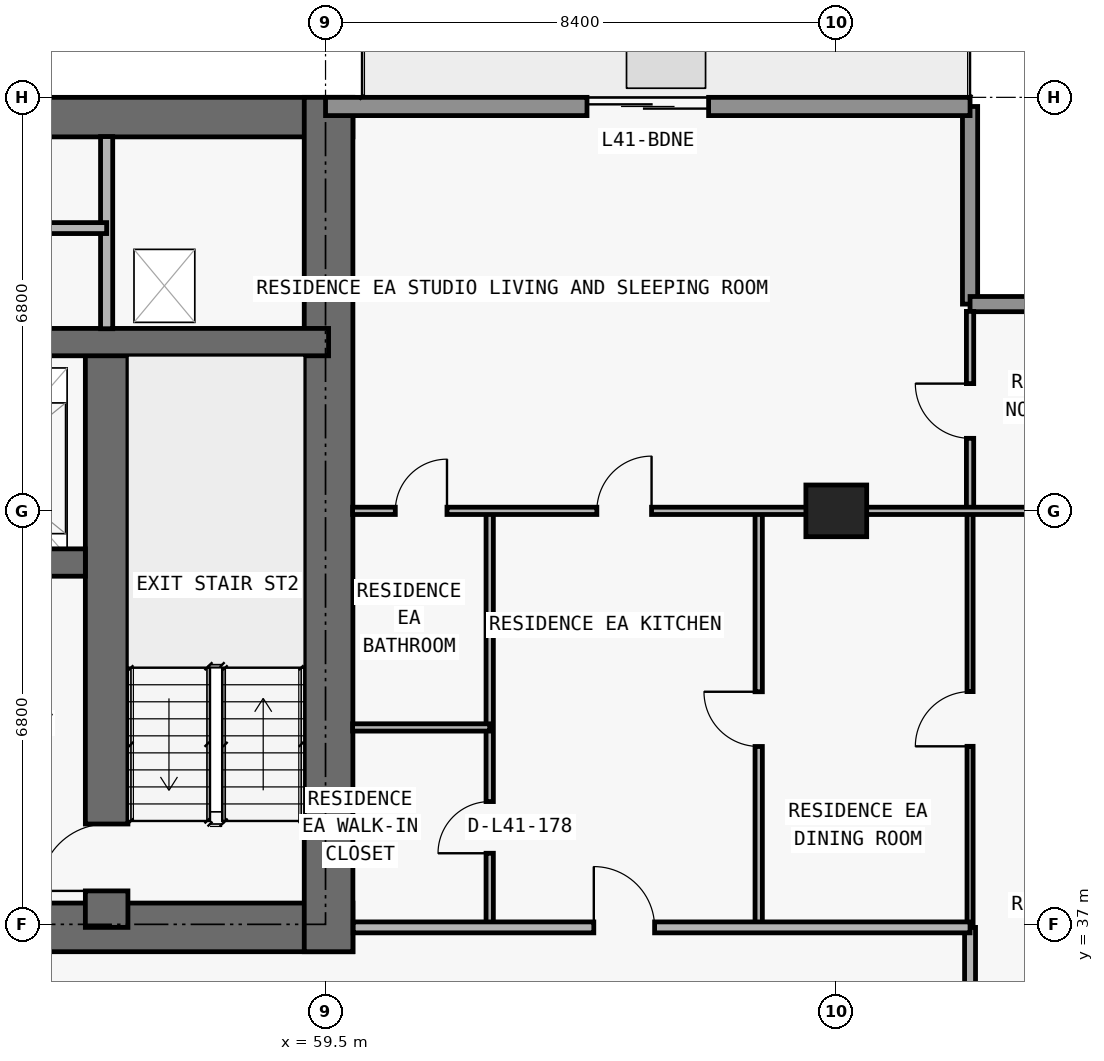
"""IFC4 building model, lengths in metres.
Left out: names, types, materials, properties, quantities, classifications, styles, units other than length and angle.
Written with IfcOpenShell. Run it as: python <this file> out.ifc"""

import sys

from ifc_helpers import new_model, si_unit, direction, frame, frame_2d, origin, origin_2d, place, context, subcontext, project, spatial, rectangle, extrude, element, fill, save


model = new_model("IFC4")
c1 = context("Model", 3, precision=1e-05, world=origin(), true_north=direction((0.0, 1.0)))
c2 = subcontext(c1, "Body", "Model", "MODEL_VIEW")
j1 = project(units=[si_unit("LENGTHUNIT", "METRE"), si_unit("PLANEANGLEUNIT", "RADIAN")], contexts=[c1])
p1 = place(None, origin())
s1 = spatial("IfcSite", under=j1, at=p1, CompositionType="ELEMENT")
p2 = place(p1, origin())
s2 = spatial("IfcBuilding", under=s1, at=p2, CompositionType="ELEMENT")
p3 = place(p2, frame((0.0, 0.0, 148.8)))
s3 = spatial("IfcBuildingStorey", under=s2, at=p3, CompositionType="ELEMENT", Elevation=148.8)
p4 = place(p3, frame((67.9, 43.8, 0.0), z_axis=(0.0, 0.0, 1.0), x_axis=(1.0, 0.0, 0.0)))
e1 = element("IfcColumn", 1, at=p4, inside=s3, PredefinedType="COLUMN", context=c2, shape_type="SweptSolid", body=[
    extrude(rectangle(XDim=1.0, YDim=0.85, at=origin_2d()), origin(), (0.0, 0.0, 1.0), 3.0),
])
p5 = place(p3, frame((17.85, 36.95, 0.0), z_axis=(0.0, 0.0, 1.0), x_axis=(1.0, 0.0, 0.0)))
e2 = element("IfcWall", 2, at=p5, inside=s3, PredefinedType="SHEAR", context=c2, shape_type="SweptSolid", body=[
    extrude(rectangle(XDim=42.1, YDim=0.8, at=frame_2d((21.05, 0.0))), origin(), (0.0, 0.0, 1.0), 3.0),
])
p6 = place(p5, frame((14.45, 0.0, 0.0)))
e3 = element("IfcOpeningElement", 3, at=p6, cuts=e2, PredefinedType="OPENING", context=c2, shape_type="SweptSolid", body=[
    extrude(rectangle(XDim=1.1, YDim=2.15, at=frame_2d((0.55, 1.075))), frame((0.0, 0.41, 0.0), z_axis=(0.0, -1.0, 0.0), x_axis=(1.0, 0.0, 0.0)), (0.0, 0.0, 1.0), 0.82),
])
p7 = place(p5, frame((6.3, 0.0, 0.0)))
e4 = element("IfcOpeningElement", 4, at=p7, cuts=e2, PredefinedType="OPENING", context=c2, shape_type="SweptSolid", body=[
    extrude(rectangle(XDim=1.05, YDim=2.15, at=frame_2d((0.525, 1.075))), frame((0.0, 0.41, 0.0), z_axis=(0.0, -1.0, 0.0), x_axis=(1.0, 0.0, 0.0)), (0.0, 0.0, 1.0), 0.82),
])
p8 = place(p5, frame((34.8, 0.0, 0.0)))
e5 = element("IfcOpeningElement", 5, at=p8, cuts=e2, PredefinedType="OPENING", context=c2, shape_type="SweptSolid", body=[
    extrude(rectangle(XDim=1.05, YDim=2.15, at=frame_2d((0.525, 1.075))), frame((0.0, 0.41, 0.0), z_axis=(0.0, -1.0, 0.0), x_axis=(1.0, 0.0, 0.0)), (0.0, 0.0, 1.0), 0.82),
])
p9 = place(p5, frame((10.913, 0.0, 0.0)))
e6 = element("IfcOpeningElement", 6, at=p9, cuts=e2, PredefinedType="OPENING", context=c2, shape_type="SweptSolid", body=[
    extrude(rectangle(XDim=1.05, YDim=2.15, at=frame_2d((0.525, 1.075))), frame((0.0, 0.41, 0.0), z_axis=(0.0, -1.0, 0.0), x_axis=(1.0, 0.0, 0.0)), (0.0, 0.0, 1.0), 0.82),
])
p10 = place(p5, frame((24.15, 0.0, 0.0)))
e7 = element("IfcOpeningElement", 7, at=p10, cuts=e2, PredefinedType="OPENING", context=c2, shape_type="SweptSolid", body=[
    extrude(rectangle(XDim=1.05, YDim=2.15, at=frame_2d((0.525, 1.075))), frame((0.0, 0.41, 0.0), z_axis=(0.0, -1.0, 0.0), x_axis=(1.0, 0.0, 0.0)), (0.0, 0.0, 1.0), 0.82),
])
p11 = place(p3, frame((17.85, 50.275, 0.0), z_axis=(0.0, 0.0, 1.0), x_axis=(1.0, 0.0, 0.0)))
e8 = element("IfcWall", 8, at=p11, inside=s3, PredefinedType="SHEAR", context=c2, shape_type="SweptSolid", body=[
    extrude(rectangle(XDim=42.1, YDim=0.65, at=frame_2d((21.05, 0.0))), origin(), (0.0, 0.0, 1.0), 3.0),
])
p12 = place(p3, frame((59.55, 36.55, 0.0), z_axis=(0.0, 0.0, 1.0), x_axis=(0.0, 1.0, 0.0)))
e9 = element("IfcWall", 9, at=p12, inside=s3, PredefinedType="SHEAR", context=c2, shape_type="SweptSolid", body=[
    extrude(rectangle(XDim=14.05, YDim=0.8, at=frame_2d((7.025, 0.0))), origin(), (0.0, 0.0, 1.0), 3.0),
])
p13 = place(p3, frame((55.9, 36.95, 0.0), z_axis=(0.0, 0.0, 1.0), x_axis=(0.0, 1.0, 0.0)))
e10 = element("IfcWall", 10, at=p13, inside=s3, PredefinedType="SHEAR", context=c2, shape_type="SweptSolid", body=[
    extrude(rectangle(XDim=9.625, YDim=0.7, at=frame_2d((4.812, 0.0))), origin(), (0.0, 0.0, 1.0), 3.0),
])
p14 = place(p13, frame((0.6, 0.0, 0.0)))
e11 = element("IfcOpeningElement", 11, at=p14, cuts=e10, PredefinedType="OPENING", context=c2, shape_type="SweptSolid", body=[
    extrude(rectangle(XDim=1.1, YDim=2.15, at=frame_2d((0.55, 1.075))), frame((0.0, 0.36, 0.0), z_axis=(0.0, -1.0, 0.0), x_axis=(1.0, 0.0, 0.0)), (0.0, 0.0, 1.0), 0.72),
])
p15 = place(p3, frame((22.25, 42.95, 0.0), z_axis=(0.0, 0.0, 1.0), x_axis=(1.0, 0.0, 0.0)))
e12 = element("IfcWall", 12, at=p15, inside=s3, PredefinedType="SHEAR", context=c2, shape_type="SweptSolid", body=[
    extrude(rectangle(XDim=33.3, YDim=0.45, at=frame_2d((16.65, 0.0))), origin(), (0.0, 0.0, 1.0), 3.0),
])
p16 = place(p15, frame((1.05, 0.0, 0.0)))
e13 = element("IfcOpeningElement", 13, at=p16, cuts=e12, PredefinedType="OPENING", context=c2, shape_type="SweptSolid", body=[
    extrude(rectangle(XDim=1.2, YDim=2.2, at=frame_2d((0.6, 1.1))), frame((0.0, 0.235, 0.0), z_axis=(0.0, -1.0, 0.0), x_axis=(1.0, 0.0, 0.0)), (0.0, 0.0, 1.0), 0.47),
])
p17 = place(p15, frame((31.05, 0.0, 0.0)))
e14 = element("IfcOpeningElement", 14, at=p17, cuts=e12, PredefinedType="OPENING", context=c2, shape_type="SweptSolid", body=[
    extrude(rectangle(XDim=1.2, YDim=2.2, at=frame_2d((0.6, 1.1))), frame((0.0, 0.235, 0.0), z_axis=(0.0, -1.0, 0.0), x_axis=(1.0, 0.0, 0.0)), (0.0, 0.0, 1.0), 0.47),
])
p18 = place(p15, frame((21.4, 0.0, 0.0)))
e15 = element("IfcOpeningElement", 15, at=p18, cuts=e12, PredefinedType="OPENING", context=c2, shape_type="SweptSolid", body=[
    extrude(rectangle(XDim=1.1, YDim=2.2, at=frame_2d((0.55, 1.1))), frame((0.0, 0.235, 0.0), z_axis=(0.0, -1.0, 0.0), x_axis=(1.0, 0.0, 0.0)), (0.0, 0.0, 1.0), 0.47),
])
p19 = place(p15, frame((24.0, 0.0, 0.0)))
e16 = element("IfcOpeningElement", 16, at=p19, cuts=e12, PredefinedType="OPENING", context=c2, shape_type="SweptSolid", body=[
    extrude(rectangle(XDim=1.1, YDim=2.2, at=frame_2d((0.55, 1.1))), frame((0.0, 0.235, 0.0), z_axis=(0.0, -1.0, 0.0), x_axis=(1.0, 0.0, 0.0)), (0.0, 0.0, 1.0), 0.47),
])
p20 = place(p15, frame((3.625, 0.0, 0.0)))
e17 = element("IfcOpeningElement", 17, at=p20, cuts=e12, PredefinedType="OPENING", context=c2, shape_type="SweptSolid", body=[
    extrude(rectangle(XDim=1.05, YDim=2.15, at=frame_2d((0.525, 1.075))), frame((0.0, 0.235, 0.0), z_axis=(0.0, -1.0, 0.0), x_axis=(1.0, 0.0, 0.0)), (0.0, 0.0, 1.0), 0.47),
])
p21 = place(p15, frame((28.675, 0.0, 0.0)))
e18 = element("IfcOpeningElement", 18, at=p21, cuts=e12, PredefinedType="OPENING", context=c2, shape_type="SweptSolid", body=[
    extrude(rectangle(XDim=1.05, YDim=2.15, at=frame_2d((0.525, 1.075))), frame((0.0, 0.235, 0.0), z_axis=(0.0, -1.0, 0.0), x_axis=(1.0, 0.0, 0.0)), (0.0, 0.0, 1.0), 0.47),
])
p22 = place(p15, frame((13.925, 0.0, 0.0)))
e19 = element("IfcOpeningElement", 19, at=p22, cuts=e12, PredefinedType="OPENING", context=c2, shape_type="SweptSolid", body=[
    extrude(rectangle(XDim=1.0, YDim=2.2, at=frame_2d((0.5, 1.1))), frame((0.0, 0.235, 0.0), z_axis=(0.0, -1.0, 0.0), x_axis=(1.0, 0.0, 0.0)), (0.0, 0.0, 1.0), 0.47),
])
p23 = place(p15, frame((18.05, 0.0, 0.0)))
e20 = element("IfcOpeningElement", 20, at=p23, cuts=e12, PredefinedType="OPENING", context=c2, shape_type="SweptSolid", body=[
    extrude(rectangle(XDim=1.0, YDim=2.2, at=frame_2d((0.5, 1.1))), frame((0.0, 0.235, 0.0), z_axis=(0.0, -1.0, 0.0), x_axis=(1.0, 0.0, 0.0)), (0.0, 0.0, 1.0), 0.47),
])
p24 = place(p3, frame((18.25, 46.575, 0.0), z_axis=(0.0, 0.0, 1.0), x_axis=(1.0, 0.0, 0.0)))
e21 = element("IfcWall", 21, at=p24, inside=s3, PredefinedType="SHEAR", context=c2, shape_type="SweptSolid", body=[
    extrude(rectangle(XDim=41.3, YDim=0.45, at=frame_2d((20.65, 0.0))), origin(), (0.0, 0.0, 1.0), 3.0),
])
p25 = place(p24, frame((7.625, 0.0, 0.0)))
e22 = element("IfcOpeningElement", 22, at=p25, cuts=e21, PredefinedType="OPENING", context=c2, shape_type="SweptSolid", body=[
    extrude(rectangle(XDim=1.05, YDim=2.15, at=frame_2d((0.525, 1.075))), frame((0.0, 0.235, 0.0), z_axis=(0.0, -1.0, 0.0), x_axis=(1.0, 0.0, 0.0)), (0.0, 0.0, 1.0), 0.47),
])
p26 = place(p24, frame((32.675, 0.0, 0.0)))
e23 = element("IfcOpeningElement", 23, at=p26, cuts=e21, PredefinedType="OPENING", context=c2, shape_type="SweptSolid", body=[
    extrude(rectangle(XDim=1.05, YDim=2.15, at=frame_2d((0.525, 1.075))), frame((0.0, 0.235, 0.0), z_axis=(0.0, -1.0, 0.0), x_axis=(1.0, 0.0, 0.0)), (0.0, 0.0, 1.0), 0.47),
])
p27 = place(p3, frame((70.1, 50.45, 0.0), z_axis=(0.0, 0.0, 1.0), x_axis=(0.0, -1.0, 0.0)))
e24 = element("IfcWall", 24, at=p27, inside=s3, PredefinedType="ELEMENTEDWALL", context=c2, shape_type="SweptSolid", body=[
    extrude(rectangle(XDim=3.25, YDim=0.25, at=frame_2d((1.625, 0.0))), origin(), (0.0, 0.0, 1.0), 3.0),
])
p28 = place(p3, frame((70.1, 47.2, 0.0), z_axis=(0.0, 0.0, 1.0), x_axis=(1.0, 0.0, 0.0)))
e25 = element("IfcWall", 25, at=p28, inside=s3, PredefinedType="ELEMENTEDWALL", context=c2, shape_type="SweptSolid", body=[
    extrude(rectangle(XDim=3.65, YDim=0.25, at=frame_2d((1.825, 0.0))), origin(), (0.0, 0.0, 1.0), 3.0),
])
p29 = place(p3, frame((59.5, 50.45, 0.0), z_axis=(0.0, 0.0, 1.0), x_axis=(1.0, 0.0, 0.0)))
e26 = element("IfcWall", 26, at=p29, inside=s3, PredefinedType="STANDARD", context=c2, shape_type="SweptSolid", body=[
    extrude(rectangle(XDim=10.6, YDim=0.3, at=frame_2d((5.3, 0.0))), origin(), (0.0, 0.0, 1.0), 3.0),
])
p30 = place(p29, frame((4.3, 0.0, 0.0)))
e27 = element("IfcOpeningElement", 27, at=p30, cuts=e26, PredefinedType="OPENING", context=c2, shape_type="SweptSolid", body=[
    extrude(rectangle(XDim=2.0, YDim=2.3, at=frame_2d((1.0, 1.15))), frame((0.0, 0.16, 0.0), z_axis=(0.0, -1.0, 0.0), x_axis=(1.0, 0.0, 0.0)), (0.0, 0.0, 1.0), 0.32),
])
p31 = place(p3, frame((55.9, 46.795, 0.0), z_axis=(0.0, 0.0, 1.0), x_axis=(0.0, 1.0, 0.0)))
e28 = element("IfcWall", 28, at=p31, inside=s3, PredefinedType="PARTITIONING", context=c2, shape_type="SweptSolid", body=[
    extrude(rectangle(XDim=3.16, YDim=0.2, at=frame_2d((1.58, 0.0))), origin(), (0.0, 0.0, 1.0), 3.0),
])
p32 = place(p3, frame((62.2, 36.95, 0.0), z_axis=(0.0, 0.0, 1.0), x_axis=(0.0, 1.0, 0.0)))
e29 = element("IfcWall", 29, at=p32, inside=s3, PredefinedType="PARTITIONING", context=c2, shape_type="SweptSolid", body=[
    extrude(rectangle(XDim=6.85, YDim=0.12, at=frame_2d((3.425, 0.0))), origin(), (0.0, 0.0, 1.0), 3.0),
])
p33 = place(p32, frame((1.219, 0.0, 0.0)))
e30 = element("IfcOpeningElement", 30, at=p33, cuts=e29, PredefinedType="OPENING", context=c2, shape_type="SweptSolid", body=[
    extrude(rectangle(XDim=0.85, YDim=2.1, at=frame_2d((0.425, 1.05))), frame((0.0, 0.07, 0.0), z_axis=(0.0, -1.0, 0.0), x_axis=(1.0, 0.0, 0.0)), (0.0, 0.0, 1.0), 0.14),
])
p34 = place(p3, frame((66.624, 36.95, 0.0), z_axis=(0.0, 0.0, 1.0), x_axis=(0.0, 1.0, 0.0)))
e31 = element("IfcWall", 31, at=p34, inside=s3, PredefinedType="PARTITIONING", context=c2, shape_type="SweptSolid", body=[
    extrude(rectangle(XDim=6.85, YDim=0.12, at=frame_2d((3.425, 0.0))), origin(), (0.0, 0.0, 1.0), 3.0),
])
p35 = place(p34, frame((2.975, 0.0, 0.0)))
e32 = element("IfcOpeningElement", 32, at=p35, cuts=e31, PredefinedType="OPENING", context=c2, shape_type="SweptSolid", body=[
    extrude(rectangle(XDim=0.9, YDim=2.15, at=frame_2d((0.45, 1.075))), frame((0.0, 0.07, 0.0), z_axis=(0.0, -1.0, 0.0), x_axis=(1.0, 0.0, 0.0)), (0.0, 0.0, 1.0), 0.14),
])
p36 = place(p3, frame((70.1, 34.205, 0.0), z_axis=(0.0, 0.0, 1.0), x_axis=(0.0, 1.0, 0.0)))
e33 = element("IfcWall", 33, at=p36, inside=s3, PredefinedType="PARTITIONING", context=c2, shape_type="SweptSolid", body=[
    extrude(rectangle(XDim=2.745, YDim=0.18, at=frame_2d((1.373, 0.0))), origin(), (0.0, 0.0, 1.0), 3.0),
])
p37 = place(p3, frame((70.1, 36.955, 0.0), z_axis=(0.0, 0.0, 1.0), x_axis=(0.0, 1.0, 0.0)))
e34 = element("IfcWall", 34, at=p37, inside=s3, PredefinedType="MOVABLE", context=c2, shape_type="SweptSolid", body=[
    extrude(rectangle(XDim=6.845, YDim=0.1, at=frame_2d((3.422, 0.0))), origin(), (0.0, 0.0, 1.0), 3.0),
])
p38 = place(p37, frame((2.972, 0.0, 0.0)))
e35 = element("IfcOpeningElement", 35, at=p38, cuts=e34, PredefinedType="OPENING", context=c2, shape_type="SweptSolid", body=[
    extrude(rectangle(XDim=0.9, YDim=2.15, at=frame_2d((0.45, 1.075))), frame((0.0, 0.06, 0.0), z_axis=(0.0, -1.0, 0.0), x_axis=(1.0, 0.0, 0.0)), (0.0, 0.0, 1.0), 0.12),
])
p39 = place(p3, frame((70.1, 43.805, 0.0), z_axis=(0.0, 0.0, 1.0), x_axis=(0.0, 1.0, 0.0)))
e36 = element("IfcWall", 36, at=p39, inside=s3, PredefinedType="PARTITIONING", context=c2, shape_type="SweptSolid", body=[
    extrude(rectangle(XDim=3.275, YDim=0.12, at=frame_2d((1.638, 0.0))), origin(), (0.0, 0.0, 1.0), 3.0),
])
p40 = place(p39, frame((1.188, 0.0, 0.0)))
e37 = element("IfcOpeningElement", 37, at=p40, cuts=e36, PredefinedType="OPENING", context=c2, shape_type="SweptSolid", body=[
    extrude(rectangle(XDim=0.9, YDim=2.15, at=frame_2d((0.45, 1.075))), frame((0.0, 0.07, 0.0), z_axis=(0.0, -1.0, 0.0), x_axis=(1.0, 0.0, 0.0)), (0.0, 0.0, 1.0), 0.14),
])
p41 = place(p3, frame((59.955, 36.95, 0.0), z_axis=(0.0, 0.0, 1.0), x_axis=(1.0, 0.0, 0.0)))
e38 = element("IfcWall", 38, at=p41, inside=s3, PredefinedType="PARTITIONING", context=c2, shape_type="SweptSolid", body=[
    extrude(rectangle(XDim=10.145, YDim=0.18, at=frame_2d((5.073, 0.0))), origin(), (0.0, 0.0, 1.0), 3.0),
])
p42 = place(p41, frame((3.957, 0.0, 0.0)))
e39 = element("IfcOpeningElement", 39, at=p42, cuts=e38, PredefinedType="OPENING", context=c2, shape_type="SweptSolid", body=[
    extrude(rectangle(XDim=1.0, YDim=2.2, at=frame_2d((0.5, 1.1))), frame((0.0, 0.1, 0.0), z_axis=(0.0, -1.0, 0.0), x_axis=(1.0, 0.0, 0.0)), (0.0, 0.0, 1.0), 0.2),
])
p43 = place(p3, frame((59.945, 40.238, 0.0), z_axis=(0.0, 0.0, 1.0), x_axis=(1.0, 0.0, 0.0)))
e40 = element("IfcWall", 40, at=p43, inside=s3, PredefinedType="PARTITIONING", context=c2, shape_type="SweptSolid", body=[
    extrude(rectangle(XDim=2.255, YDim=0.12, at=frame_2d((1.127, 0.0))), origin(), (0.0, 0.0, 1.0), 3.0),
])
p44 = place(p3, frame((59.945, 43.8, 0.0), z_axis=(0.0, 0.0, 1.0), x_axis=(1.0, 0.0, 0.0)))
e41 = element("IfcWall", 41, at=p44, inside=s3, PredefinedType="PARTITIONING", context=c2, shape_type="SweptSolid", body=[
    extrude(rectangle(XDim=13.66, YDim=0.12, at=frame_2d((6.83, 0.0))), origin(), (0.0, 0.0, 1.0), 2.289),
])
p45 = place(p44, frame((4.017, 0.0, 0.0)))
e42 = element("IfcOpeningElement", 42, at=p45, cuts=e41, PredefinedType="OPENING", context=c2, shape_type="SweptSolid", body=[
    extrude(rectangle(XDim=0.9, YDim=2.15, at=frame_2d((0.45, 1.075))), frame((0.0, 0.07, 0.0), z_axis=(0.0, -1.0, 0.0), x_axis=(1.0, 0.0, 0.0)), (0.0, 0.0, 1.0), 0.14),
])
p46 = place(p44, frame((0.702, 0.0, 0.0)))
e43 = element("IfcOpeningElement", 43, at=p46, cuts=e41, PredefinedType="OPENING", context=c2, shape_type="SweptSolid", body=[
    extrude(rectangle(XDim=0.85, YDim=2.1, at=frame_2d((0.425, 1.05))), frame((0.0, 0.07, 0.0), z_axis=(0.0, -1.0, 0.0), x_axis=(1.0, 0.0, 0.0)), (0.0, 0.0, 1.0), 0.14),
])
p47 = place(p3, frame((26.7, 48.45, 0.0), z_axis=(0.0, 0.0, 1.0), x_axis=(1.0, 0.0, 0.0)))
e44 = element("IfcWall", 44, at=p47, inside=s3, PredefinedType="PARTITIONING", context=c2, shape_type="SweptSolid", body=[
    extrude(rectangle(XDim=29.2, YDim=0.18, at=frame_2d((14.6, 0.0))), origin(), (0.0, 0.0, 1.0), 3.0),
])
p48 = place(p47, frame((1.75, 0.0, 0.0)))
e45 = element("IfcOpeningElement", 45, at=p48, cuts=e44, PredefinedType="OPENING", context=c2, shape_type="SweptSolid", body=[
    extrude(rectangle(XDim=1.2, YDim=2.2, at=frame_2d((0.6, 1.1))), frame((0.0, 0.1, 0.0), z_axis=(0.0, -1.0, 0.0), x_axis=(1.0, 0.0, 0.0)), (0.0, 0.0, 1.0), 0.2),
])
p49 = place(p47, frame((6.475, 0.0, 0.0)))
e46 = element("IfcOpeningElement", 46, at=p49, cuts=e44, PredefinedType="OPENING", context=c2, shape_type="SweptSolid", body=[
    extrude(rectangle(XDim=1.2, YDim=2.2, at=frame_2d((0.6, 1.1))), frame((0.0, 0.1, 0.0), z_axis=(0.0, -1.0, 0.0), x_axis=(1.0, 0.0, 0.0)), (0.0, 0.0, 1.0), 0.2),
])
p50 = place(p47, frame((14.05, 0.0, 0.0)))
e47 = element("IfcOpeningElement", 47, at=p50, cuts=e44, PredefinedType="OPENING", context=c2, shape_type="SweptSolid", body=[
    extrude(rectangle(XDim=1.0, YDim=2.2, at=frame_2d((0.5, 1.1))), frame((0.0, 0.1, 0.0), z_axis=(0.0, -1.0, 0.0), x_axis=(1.0, 0.0, 0.0)), (0.0, 0.0, 1.0), 0.2),
])
p51 = place(p47, frame((21.425, 0.0, 0.0)))
e48 = element("IfcOpeningElement", 48, at=p51, cuts=e44, PredefinedType="OPENING", context=c2, shape_type="SweptSolid", body=[
    extrude(rectangle(XDim=1.2, YDim=2.2, at=frame_2d((0.6, 1.1))), frame((0.0, 0.1, 0.0), z_axis=(0.0, -1.0, 0.0), x_axis=(1.0, 0.0, 0.0)), (0.0, 0.0, 1.0), 0.2),
])
p52 = place(p47, frame((26.375, 0.0, 0.0)))
e49 = element("IfcOpeningElement", 49, at=p52, cuts=e44, PredefinedType="OPENING", context=c2, shape_type="SweptSolid", body=[
    extrude(rectangle(XDim=0.85, YDim=2.1, at=frame_2d((0.425, 1.05))), frame((0.0, 0.1, 0.0), z_axis=(0.0, -1.0, 0.0), x_axis=(1.0, 0.0, 0.0)), (0.0, 0.0, 1.0), 0.2),
])
p53 = place(p30, origin())
e50 = element("IfcDoor", 50, at=p53, inside=s3, OperationType="DOUBLE_DOOR_SLIDING", PredefinedType="DOOR", context=c2, shape_type="SweptSolid", body=[
    extrude(rectangle(XDim=2.0, YDim=2.3, at=frame_2d((1.0, 1.15))), frame((0.0, 0.025, 0.0), z_axis=(0.0, -1.0, 0.0), x_axis=(1.0, 0.0, 0.0)), (0.0, 0.0, 1.0), 0.05),
])
fill(e27, e50)
p54 = place(p14, origin())
e51 = element("IfcDoor", 51, at=p54, inside=s3, OperationType="SINGLE_SWING_LEFT", PredefinedType="DOOR", context=c2, shape_type="SweptSolid", body=[
    extrude(rectangle(XDim=1.1, YDim=2.15, at=frame_2d((0.55, 1.075))), frame((0.0, 0.025, 0.0), z_axis=(0.0, -1.0, 0.0), x_axis=(1.0, 0.0, 0.0)), (0.0, 0.0, 1.0), 0.05),
])
fill(e11, e51)
p55 = place(p35, origin())
e52 = element("IfcDoor", 52, at=p55, inside=s3, OperationType="SINGLE_SWING_RIGHT", PredefinedType="DOOR", context=c2, shape_type="SweptSolid", body=[
    extrude(rectangle(XDim=0.9, YDim=2.15, at=frame_2d((0.45, 1.075))), frame((0.0, 0.025, 0.0), z_axis=(0.0, -1.0, 0.0), x_axis=(1.0, 0.0, 0.0)), (0.0, 0.0, 1.0), 0.05),
])
fill(e32, e52)
p56 = place(p42, origin())
e53 = element("IfcDoor", 53, at=p56, inside=s3, OperationType="SINGLE_SWING_LEFT", PredefinedType="DOOR", context=c2, shape_type="SweptSolid", body=[
    extrude(rectangle(XDim=1.0, YDim=2.2, at=frame_2d((0.5, 1.1))), frame((0.0, 0.025, 0.0), z_axis=(0.0, -1.0, 0.0), x_axis=(1.0, 0.0, 0.0)), (0.0, 0.0, 1.0), 0.05),
])
fill(e39, e53)
p57 = place(p45, origin())
e54 = element("IfcDoor", 54, at=p57, inside=s3, OperationType="SINGLE_SWING_RIGHT", PredefinedType="DOOR", context=c2, shape_type="SweptSolid", body=[
    extrude(rectangle(XDim=0.9, YDim=2.15, at=frame_2d((0.45, 1.075))), frame((0.0, 0.025, 0.0), z_axis=(0.0, -1.0, 0.0), x_axis=(1.0, 0.0, 0.0)), (0.0, 0.0, 1.0), 0.05),
])
fill(e42, e54)
p58 = place(p33, origin())
e55 = element("IfcDoor", 55, at=p58, inside=s3, OperationType="SINGLE_SWING_LEFT", PredefinedType="DOOR", context=c2, shape_type="SweptSolid", body=[
    extrude(rectangle(XDim=0.85, YDim=2.1, at=frame_2d((0.425, 1.05))), frame((0.0, 0.025, 0.0), z_axis=(0.0, -1.0, 0.0), x_axis=(1.0, 0.0, 0.0)), (0.0, 0.0, 1.0), 0.05),
])
fill(e30, e55)
p59 = place(p46, origin())
e56 = element("IfcDoor", 56, at=p59, inside=s3, OperationType="SINGLE_SWING_RIGHT", PredefinedType="DOOR", context=c2, shape_type="SweptSolid", body=[
    extrude(rectangle(XDim=0.85, YDim=2.1, at=frame_2d((0.425, 1.05))), frame((0.0, 0.025, 0.0), z_axis=(0.0, -1.0, 0.0), x_axis=(1.0, 0.0, 0.0)), (0.0, 0.0, 1.0), 0.05),
])
fill(e43, e56)
p60 = place(p38, origin())
e57 = element("IfcDoor", 57, at=p60, inside=s3, OperationType="SINGLE_SWING_LEFT", PredefinedType="DOOR", context=c2, shape_type="SweptSolid", body=[
    extrude(rectangle(XDim=0.9, YDim=2.15, at=frame_2d((0.45, 1.075))), frame((0.0, 0.025, 0.0), z_axis=(0.0, -1.0, 0.0), x_axis=(1.0, 0.0, 0.0)), (0.0, 0.0, 1.0), 0.05),
])
fill(e35, e57)
p61 = place(p40, origin())
e58 = element("IfcDoor", 58, at=p61, inside=s3, OperationType="SINGLE_SWING_RIGHT", PredefinedType="DOOR", context=c2, shape_type="SweptSolid", body=[
    extrude(rectangle(XDim=0.9, YDim=2.15, at=frame_2d((0.45, 1.075))), frame((0.0, 0.025, 0.0), z_axis=(0.0, -1.0, 0.0), x_axis=(1.0, 0.0, 0.0)), (0.0, 0.0, 1.0), 0.05),
])
fill(e37, e58)
save(model, sys.argv[1])
